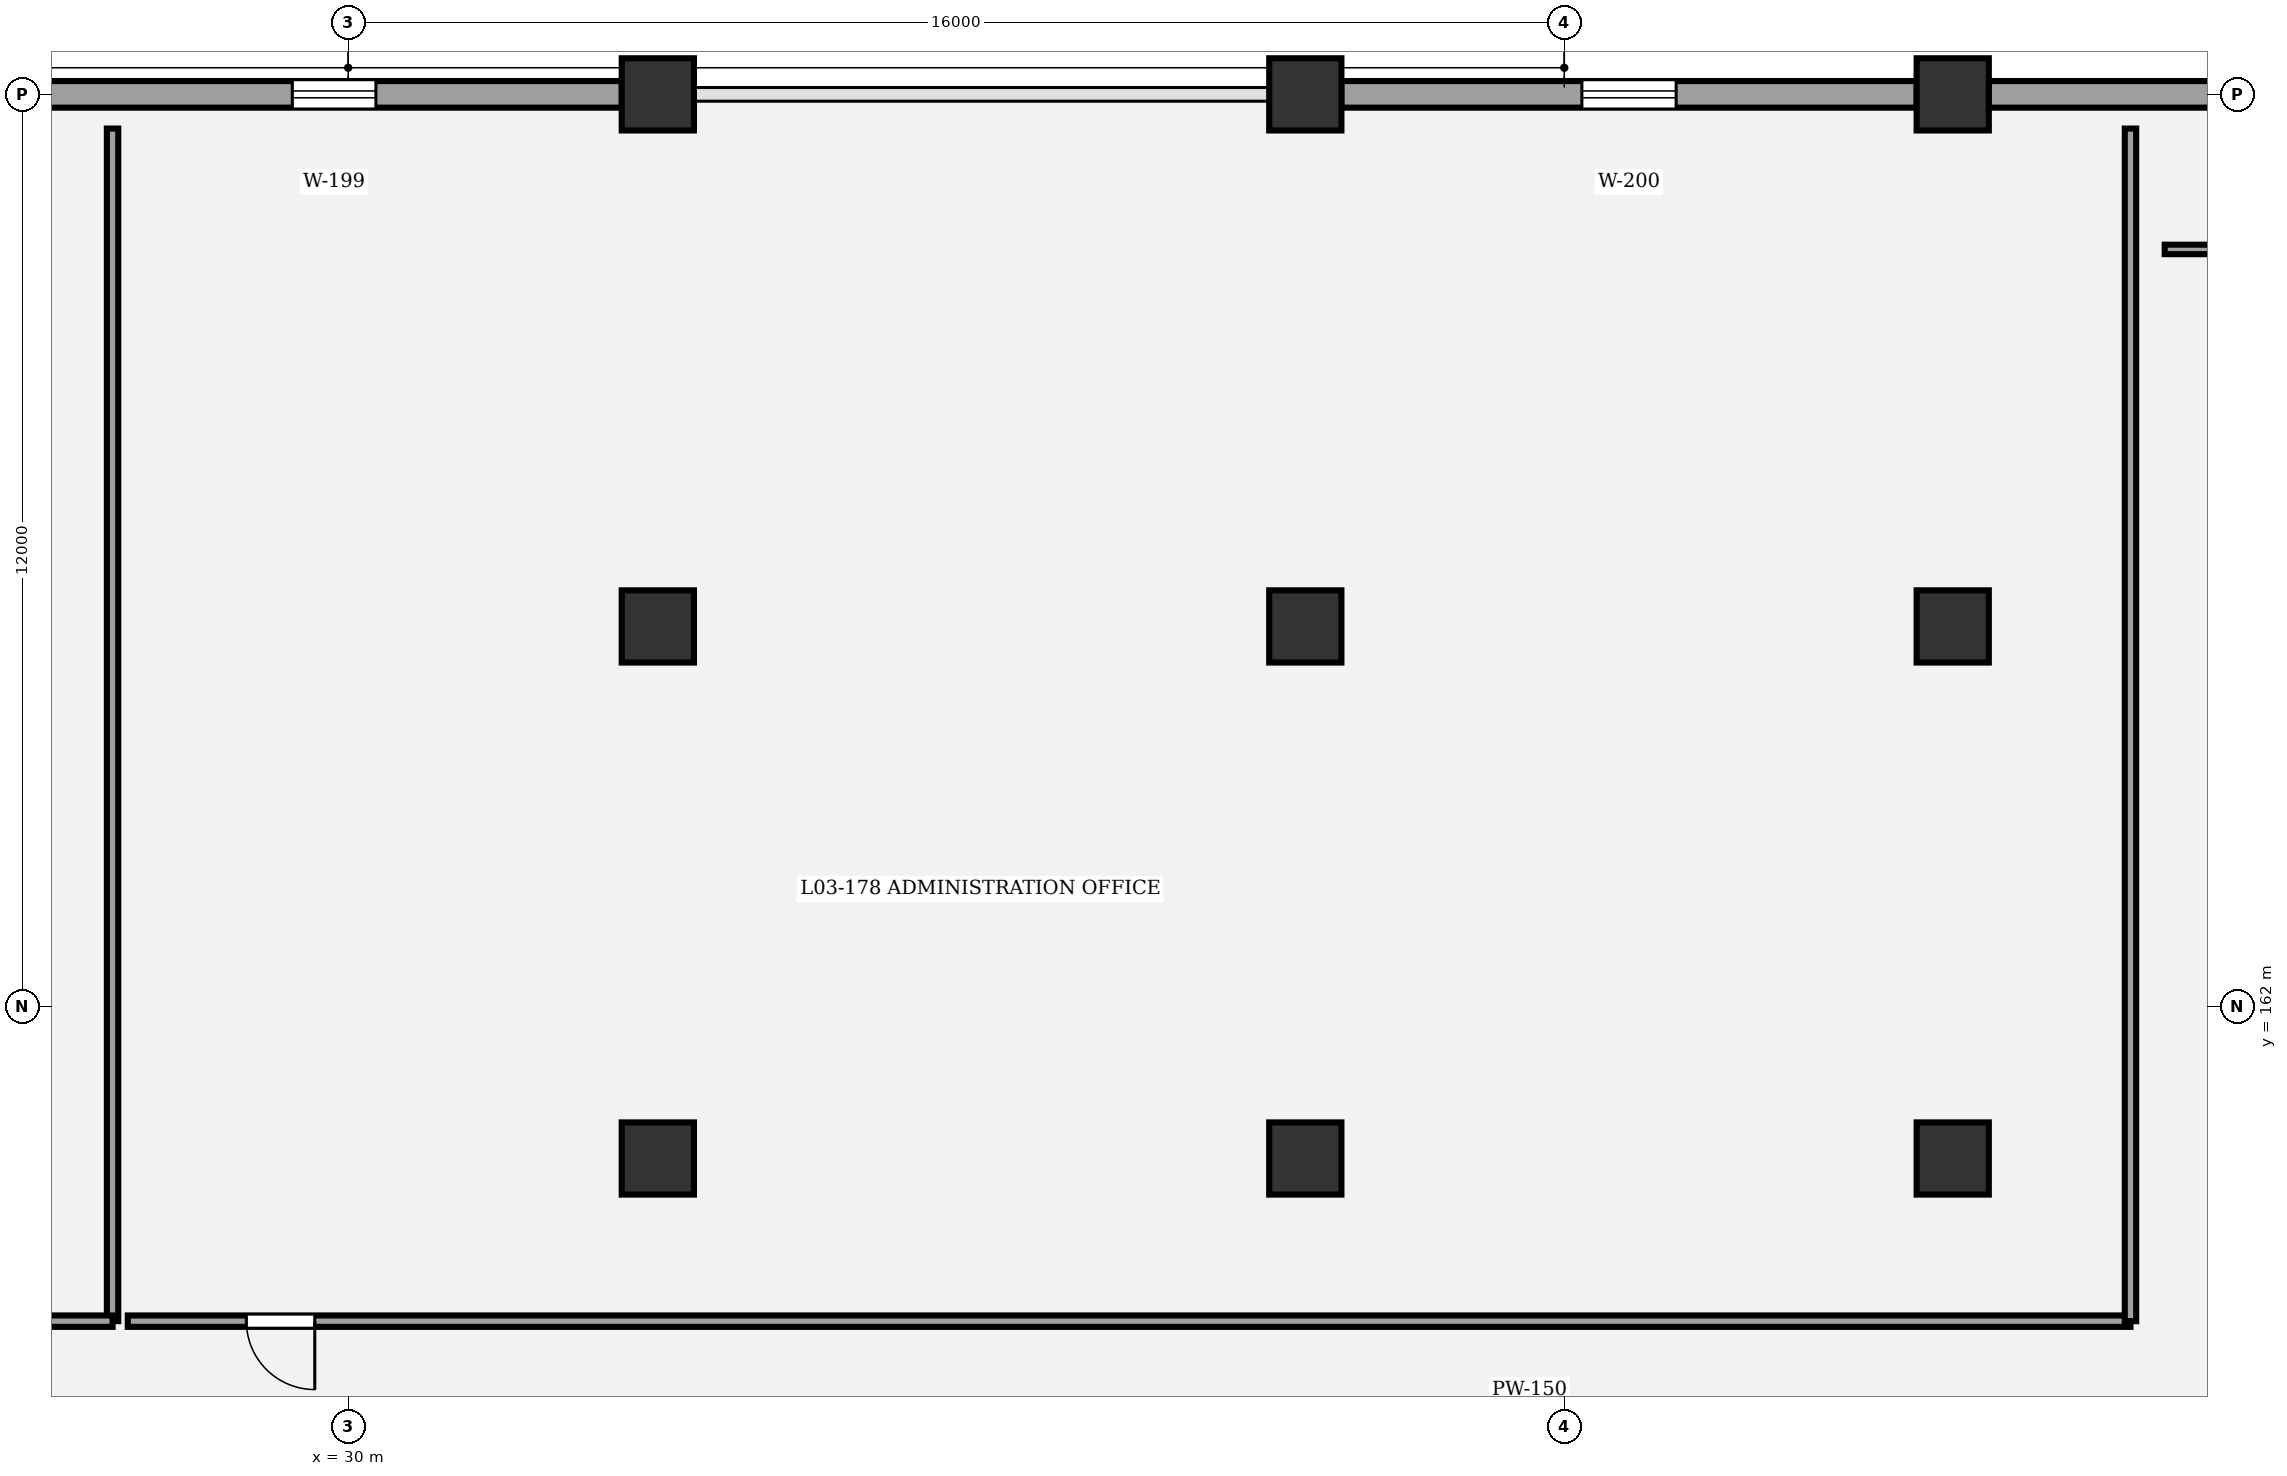
"""IFC4 building model, lengths in metres.
Left out: names, types, materials, properties, quantities, classifications, styles, units other than length and angle.
Written with IfcOpenShell. Run it as: python <this file> out.ifc"""

import sys

from ifc_helpers import new_model, si_unit, direction, frame, frame_2d, origin, origin_2d, place, context, subcontext, project, spatial, rectangle, circle, extrude, element, fill, save


model = new_model("IFC4")
c1 = context("Model", 3, precision=1e-05, world=origin(), true_north=direction((0.0, 1.0)))
c2 = subcontext(c1, "Body", "Model", "MODEL_VIEW")
j1 = project(units=[si_unit("LENGTHUNIT", "METRE"), si_unit("PLANEANGLEUNIT", "RADIAN")], contexts=[c1])
p1 = place(None, origin())
s1 = spatial("IfcSite", under=j1, at=p1, CompositionType="ELEMENT")
p2 = place(p1, origin())
s2 = spatial("IfcBuilding", under=s1, at=p2, CompositionType="ELEMENT")
p3 = place(p2, frame((0.0, 0.0, 14.7)))
s3 = spatial("IfcBuildingStorey", under=s2, at=p3, CompositionType="ELEMENT", Elevation=14.7)
for number, where, z_axis, x_axis in (
    (1, (34.074, 160.0, 0.0), (0.0, 0.0, 1.0), (1.0, 0.0, 0.0)),
    (2, (34.074, 167.0, 0.0), (0.0, 0.0, 1.0), (1.0, 0.0, 0.0)),
    (3, (34.074, 174.0, 0.0), (0.0, 0.0, 1.0), (1.0, 0.0, 0.0)),
    (4, (42.593, 160.0, 0.0), (0.0, 0.0, 1.0), (1.0, 0.0, 0.0)),
    (5, (42.593, 167.0, 0.0), (0.0, 0.0, 1.0), (1.0, 0.0, 0.0)),
    (6, (42.593, 174.0, 0.0), (0.0, 0.0, 1.0), (1.0, 0.0, 0.0)),
    (7, (51.111, 160.0, 0.0), (0.0, 0.0, 1.0), (1.0, 0.0, 0.0)),
    (8, (51.111, 167.0, 0.0), (0.0, 0.0, 1.0), (1.0, 0.0, 0.0)),
    (9, (51.111, 174.0, 0.0), (0.0, 0.0, 1.0), (1.0, 0.0, 0.0)),
):
    element("IfcColumn", number, at=place(p3, frame(where, z_axis=z_axis, x_axis=x_axis)), inside=s3, PredefinedType="COLUMN", context=c2, shape_type="SweptSolid", body=[
        extrude(circle(Radius=0.475, at=origin_2d()), origin(), (0.0, 0.0, 1.0), 4.5),
    ])
p4 = place(p3, frame((26.029, 174.0, 0.0), z_axis=(0.0, 0.0, 1.0), x_axis=(1.0, 0.0, 0.0)))
e10 = element("IfcWall", 10, at=p4, inside=s3, PredefinedType="STANDARD", context=c2, shape_type="SweptSolid", body=[
    extrude(rectangle(XDim=7.572, YDim=0.35, at=frame_2d((3.786, 0.0))), origin(), (0.0, 0.0, 1.0), 3.26),
])
p5 = place(p4, frame((3.236, 0.0, 0.9)))
e11 = element("IfcOpeningElement", 11, at=p5, cuts=e10, PredefinedType="OPENING", context=c2, shape_type="SweptSolid", body=[
    extrude(rectangle(XDim=1.1, YDim=1.95, at=frame_2d((0.55, 0.975))), frame((0.0, 0.185, 0.0), z_axis=(0.0, -1.0, 0.0), x_axis=(1.0, 0.0, 0.0)), (0.0, 0.0, 1.0), 0.37),
])
p6 = place(p3, frame((43.066, 174.0, 0.0), z_axis=(0.0, 0.0, 1.0), x_axis=(1.0, 0.0, 0.0)))
e12 = element("IfcWall", 12, at=p6, inside=s3, PredefinedType="STANDARD", context=c2, shape_type="SweptSolid", body=[
    extrude(rectangle(XDim=7.572, YDim=0.35, at=frame_2d((3.786, 0.0))), origin(), (0.0, 0.0, 1.0), 3.26),
])
p7 = place(p6, frame((3.166, 0.0, 0.9)))
e13 = element("IfcOpeningElement", 13, at=p7, cuts=e12, PredefinedType="OPENING", context=c2, shape_type="SweptSolid", body=[
    extrude(rectangle(XDim=1.24, YDim=1.95, at=frame_2d((0.62, 0.975))), frame((0.0, 0.185, 0.0), z_axis=(0.0, -1.0, 0.0), x_axis=(1.0, 0.0, 0.0)), (0.0, 0.0, 1.0), 0.37),
])
p8 = place(p3, frame((51.584, 174.0, 0.0), z_axis=(0.0, 0.0, 1.0), x_axis=(1.0, 0.0, 0.0)))
e14 = element("IfcWall", 14, at=p8, inside=s3, PredefinedType="STANDARD", context=c2, shape_type="SweptSolid", body=[
    extrude(rectangle(XDim=7.573, YDim=0.35, at=frame_2d((3.787, 0.0))), origin(), (0.0, 0.0, 1.0), 3.26),
])
p9 = place(p8, frame((3.096, 0.0, 0.9)))
e15 = element("IfcOpeningElement", 15, at=p9, cuts=e14, PredefinedType="OPENING", context=c2, shape_type="SweptSolid", body=[
    extrude(rectangle(XDim=1.38, YDim=1.95, at=frame_2d((0.69, 0.975))), frame((0.0, 0.185, 0.0), z_axis=(0.0, -1.0, 0.0), x_axis=(1.0, 0.0, 0.0)), (0.0, 0.0, 1.0), 0.37),
])
p10 = place(p3, frame((53.45, 157.86, 0.0), z_axis=(0.0, 0.0, 1.0), x_axis=(-1.0, 0.0, 0.0)))
e16 = element("IfcWall", 16, at=p10, inside=s3, PredefinedType="PARTITIONING", context=c2, shape_type="SweptSolid", body=[
    extrude(rectangle(XDim=26.35, YDim=0.15, at=frame_2d((13.175, 0.0))), origin(), (0.0, 0.0, 1.0), 3.25),
])
p11 = place(p10, frame((23.889, 0.0, 0.0)))
e17 = element("IfcOpeningElement", 17, at=p11, cuts=e16, PredefinedType="OPENING", context=c2, shape_type="SweptSolid", body=[
    extrude(rectangle(XDim=0.9, YDim=2.1, at=frame_2d((0.45, 1.05))), frame((0.0, 0.085, 0.0), z_axis=(0.0, -1.0, 0.0), x_axis=(1.0, 0.0, 0.0)), (0.0, 0.0, 1.0), 0.17),
])
p12 = place(p3, frame((80.0, 171.96, 0.0), z_axis=(0.0, 0.0, 1.0), x_axis=(-1.0, 0.0, 0.0)))
e18 = element("IfcWall", 18, at=p12, inside=s3, PredefinedType="PARTITIONING", context=c2, shape_type="SweptSolid", body=[
    extrude(rectangle(XDim=26.1, YDim=0.125, at=frame_2d((13.05, 0.0))), origin(), (0.0, 0.0, 1.0), 3.25),
])
p13 = place(p12, frame((23.576, 0.0, 0.0)))
e19 = element("IfcOpeningElement", 19, at=p13, cuts=e18, PredefinedType="OPENING", context=c2, shape_type="SweptSolid", body=[
    extrude(rectangle(XDim=0.98, YDim=2.1, at=frame_2d((0.49, 1.05))), frame((0.0, 0.073, 0.0), z_axis=(0.0, -1.0, 0.0), x_axis=(1.0, 0.0, 0.0)), (0.0, 0.0, 1.0), 0.145),
])
p14 = place(p3, frame((26.9, 173.55, 0.0), z_axis=(0.0, 0.0, 1.0), x_axis=(0.0, -1.0, 0.0)))
e20 = element("IfcWall", 20, at=p14, inside=s3, PredefinedType="PARTITIONING", context=c2, shape_type="SweptSolid", body=[
    extrude(rectangle(XDim=15.69, YDim=0.15, at=frame_2d((7.845, 0.0))), origin(), (0.0, 0.0, 1.0), 3.25),
])
p15 = place(p3, frame((26.9, 157.86, 0.0), z_axis=(0.0, 0.0, 1.0), x_axis=(-1.0, 0.0, 0.0)))
e21 = element("IfcWall", 21, at=p15, inside=s3, PredefinedType="PARTITIONING", context=c2, shape_type="SweptSolid", body=[
    extrude(rectangle(XDim=13.4, YDim=0.15, at=frame_2d((6.7, 0.0))), origin(), (0.0, 0.0, 1.0), 3.25),
])
p16 = place(p3, frame((53.45, 173.55, 0.0), z_axis=(0.0, 0.0, 1.0), x_axis=(0.0, -1.0, 0.0)))
e22 = element("IfcWall", 22, at=p16, inside=s3, PredefinedType="PARTITIONING", context=c2, shape_type="SweptSolid", body=[
    extrude(rectangle(XDim=15.69, YDim=0.15, at=frame_2d((7.845, 0.0))), origin(), (0.0, 0.0, 1.0), 3.25),
])
p17 = place(p5, origin())
e23 = element("IfcWindow", 23, at=p17, inside=s3, PartitioningType="SINGLE_PANEL", PredefinedType="WINDOW", context=c2, shape_type="SweptSolid", body=[
    extrude(rectangle(XDim=1.1, YDim=1.95, at=frame_2d((0.55, 0.975))), frame((0.0, 0.03, 0.0), z_axis=(0.0, -1.0, 0.0), x_axis=(1.0, 0.0, 0.0)), (0.0, 0.0, 1.0), 0.06),
])
fill(e11, e23)
p18 = place(p7, origin())
e24 = element("IfcWindow", 24, at=p18, inside=s3, PartitioningType="SINGLE_PANEL", PredefinedType="WINDOW", context=c2, shape_type="SweptSolid", body=[
    extrude(rectangle(XDim=1.24, YDim=1.95, at=frame_2d((0.62, 0.975))), frame((0.0, 0.03, 0.0), z_axis=(0.0, -1.0, 0.0), x_axis=(1.0, 0.0, 0.0)), (0.0, 0.0, 1.0), 0.06),
])
fill(e13, e24)
p19 = place(p11, origin())
e25 = element("IfcDoor", 25, at=p19, inside=s3, OperationType="SINGLE_SWING_LEFT", PredefinedType="DOOR", context=c2, shape_type="SweptSolid", body=[
    extrude(rectangle(XDim=0.9, YDim=2.1, at=frame_2d((0.45, 1.05))), frame((0.0, 0.025, 0.0), z_axis=(0.0, -1.0, 0.0), x_axis=(1.0, 0.0, 0.0)), (0.0, 0.0, 1.0), 0.05),
])
fill(e17, e25)
save(model, sys.argv[1])
